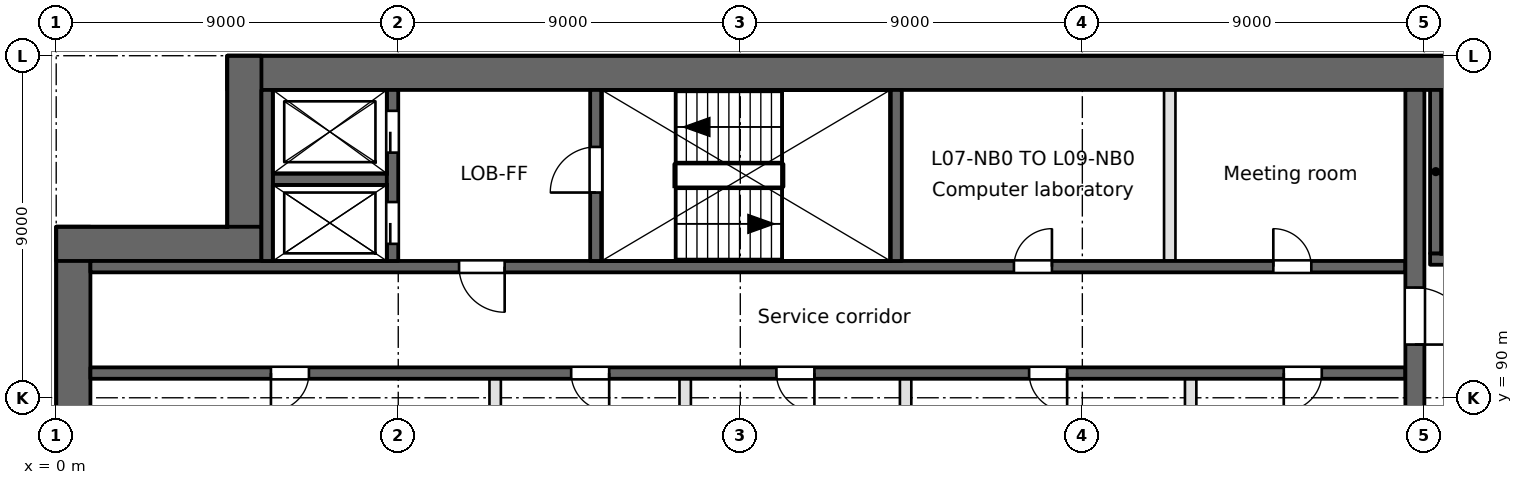
"""IFC4 building model, lengths in metres.
Left out: names, types, materials, properties, quantities, classifications, styles, units other than length and angle.
Written with IfcOpenShell. Run it as: python <this file> out.ifc"""

import sys

from ifc_helpers import new_model, si_unit, direction, frame, frame_2d, origin, place, context, subcontext, project, spatial, rectangle, extrude, element, fill, save


model = new_model("IFC4")
c1 = context("Model", 3, precision=1e-05, world=origin(), true_north=direction((0.0, 1.0)))
c2 = subcontext(c1, "Body", "Model", "MODEL_VIEW")
j1 = project(units=[si_unit("LENGTHUNIT", "METRE"), si_unit("PLANEANGLEUNIT", "RADIAN")], contexts=[c1])
p1 = place(None, origin())
s1 = spatial("IfcSite", under=j1, at=p1, CompositionType="ELEMENT")
p2 = place(p1, origin())
s2 = spatial("IfcBuilding", under=s1, at=p2, CompositionType="ELEMENT")
p3 = place(p2, frame((0.0, 0.0, 35.8)))
s3 = spatial("IfcBuildingStorey", under=s2, at=p3, CompositionType="ELEMENT", Elevation=35.8)
p4 = place(p3, frame((0.45, 94.5, 0.0), z_axis=(0.0, 0.0, 1.0), x_axis=(0.0, -1.0, 0.0)))
e1 = element("IfcWall", 1, at=p4, inside=s3, PredefinedType="SHEAR", context=c2, shape_type="SweptSolid", body=[
    extrude(rectangle(XDim=66.187, YDim=0.9, at=frame_2d((33.094, 0.0))), origin(), (0.0, 0.0, 1.0), 3.7),
])
p5 = place(p3, frame((94.5, 98.55, 0.0), z_axis=(0.0, 0.0, 1.0), x_axis=(-1.0, 0.0, 0.0)))
e2 = element("IfcWall", 2, at=p5, inside=s3, PredefinedType="SHEAR", context=c2, shape_type="SweptSolid", body=[
    extrude(rectangle(XDim=90.0, YDim=0.9, at=frame_2d((45.0, 0.0))), origin(), (0.0, 0.0, 1.0), 3.7),
])
for number, where, z_axis, x_axis in (
    (3, (4.95, 99.0, 0.0), (0.0, 0.0, 1.0), (0.0, -1.0, 0.0)),
    (4, (5.4, 94.05, 0.0), (0.0, 0.0, 1.0), (-1.0, 0.0, 0.0)),
):
    element("IfcWall", number, at=place(p3, frame(where, z_axis=z_axis, x_axis=x_axis)), inside=s3, PredefinedType="SHEAR", context=c2, shape_type="SweptSolid", body=[
        extrude(rectangle(XDim=5.4, YDim=0.9, at=frame_2d((2.7, 0.0))), origin(), (0.0, 0.0, 1.0), 3.7),
    ])
p6 = place(p3, frame((0.9, 90.65, -0.4), z_axis=(0.0, 0.0, 1.0), x_axis=(1.0, 0.0, 0.0)))
e5 = element("IfcWall", 5, at=p6, inside=s3, PredefinedType="SOLIDWALL", context=c2, shape_type="SweptSolid", body=[
    extrude(rectangle(XDim=34.6, YDim=0.3, at=frame_2d((17.3, 0.0))), origin(), (0.0, 0.0, 1.0), 3.7),
])
p7 = place(p6, frame((4.75, 0.0, 0.4)))
e6 = element("IfcOpeningElement", 6, at=p7, cuts=e5, PredefinedType="OPENING", context=c2, shape_type="SweptSolid", body=[
    extrude(rectangle(XDim=1.0, YDim=2.1, at=frame_2d((0.5, 1.05))), frame((0.0, 0.15, 0.0), z_axis=(0.0, -1.0, 0.0), x_axis=(1.0, 0.0, 0.0)), (0.0, 0.0, 1.0), 0.3),
])
p8 = place(p6, frame((24.7, 0.0, 0.4)))
e7 = element("IfcOpeningElement", 7, at=p8, cuts=e5, PredefinedType="OPENING", context=c2, shape_type="SweptSolid", body=[
    extrude(rectangle(XDim=1.0, YDim=2.1, at=frame_2d((0.5, 1.05))), frame((0.0, 0.15, 0.0), z_axis=(0.0, -1.0, 0.0), x_axis=(1.0, 0.0, 0.0)), (0.0, 0.0, 1.0), 0.3),
])
p9 = place(p6, frame((12.65, 0.0, 0.4)))
e8 = element("IfcOpeningElement", 8, at=p9, cuts=e5, PredefinedType="OPENING", context=c2, shape_type="SweptSolid", body=[
    extrude(rectangle(XDim=1.0, YDim=2.1, at=frame_2d((0.5, 1.05))), frame((0.0, 0.15, 0.0), z_axis=(0.0, -1.0, 0.0), x_axis=(1.0, 0.0, 0.0)), (0.0, 0.0, 1.0), 0.3),
])
p10 = place(p6, frame((18.05, 0.0, 0.4)))
e9 = element("IfcOpeningElement", 9, at=p10, cuts=e5, PredefinedType="OPENING", context=c2, shape_type="SweptSolid", body=[
    extrude(rectangle(XDim=1.0, YDim=2.1, at=frame_2d((0.5, 1.05))), frame((0.0, 0.15, 0.0), z_axis=(0.0, -1.0, 0.0), x_axis=(1.0, 0.0, 0.0)), (0.0, 0.0, 1.0), 0.3),
])
p11 = place(p6, frame((31.4, 0.0, 0.4)))
e10 = element("IfcOpeningElement", 10, at=p11, cuts=e5, PredefinedType="OPENING", context=c2, shape_type="SweptSolid", body=[
    extrude(rectangle(XDim=1.0, YDim=2.1, at=frame_2d((0.5, 1.05))), frame((0.0, 0.15, 0.0), z_axis=(0.0, -1.0, 0.0), x_axis=(1.0, 0.0, 0.0)), (0.0, 0.0, 1.0), 0.3),
])
p12 = place(p3, frame((0.9, 93.45, -0.4), z_axis=(0.0, 0.0, 1.0), x_axis=(1.0, 0.0, 0.0)))
e11 = element("IfcWall", 11, at=p12, inside=s3, PredefinedType="SOLIDWALL", context=c2, shape_type="SweptSolid", body=[
    extrude(rectangle(XDim=34.6, YDim=0.3, at=frame_2d((17.3, 0.0))), origin(), (0.0, 0.0, 1.0), 3.7),
])
p13 = place(p12, frame((9.7, 0.0, 0.4)))
e12 = element("IfcOpeningElement", 12, at=p13, cuts=e11, PredefinedType="OPENING", context=c2, shape_type="SweptSolid", body=[
    extrude(rectangle(XDim=1.2, YDim=2.1, at=frame_2d((0.6, 1.05))), frame((0.0, 0.15, 0.0), z_axis=(0.0, -1.0, 0.0), x_axis=(1.0, 0.0, 0.0)), (0.0, 0.0, 1.0), 0.3),
])
p14 = place(p12, frame((24.3, 0.0, 0.4)))
e13 = element("IfcOpeningElement", 13, at=p14, cuts=e11, PredefinedType="OPENING", context=c2, shape_type="SweptSolid", body=[
    extrude(rectangle(XDim=1.0, YDim=2.1, at=frame_2d((0.5, 1.05))), frame((0.0, 0.15, 0.0), z_axis=(0.0, -1.0, 0.0), x_axis=(1.0, 0.0, 0.0)), (0.0, 0.0, 1.0), 0.3),
])
p15 = place(p12, frame((31.125, 0.0, 0.4)))
e14 = element("IfcOpeningElement", 14, at=p15, cuts=e11, PredefinedType="OPENING", context=c2, shape_type="SweptSolid", body=[
    extrude(rectangle(XDim=1.0, YDim=2.1, at=frame_2d((0.5, 1.05))), frame((0.0, 0.15, 0.0), z_axis=(0.0, -1.0, 0.0), x_axis=(1.0, 0.0, 0.0)), (0.0, 0.0, 1.0), 0.3),
])
p16 = place(p3, frame((36.15, 93.65, -0.4), z_axis=(0.0, 0.0, 1.0), x_axis=(1.0, 0.0, 0.0)))
e15 = element("IfcWall", 15, at=p16, inside=s3, PredefinedType="SOLIDWALL", context=c2, shape_type="SweptSolid", body=[
    extrude(rectangle(XDim=8.2, YDim=0.3, at=frame_2d((4.1, 0.0))), origin(), (0.0, 0.0, 1.0), 3.7),
])
p17 = place(p16, frame((0.7, 0.0, 0.4)))
e16 = element("IfcOpeningElement", 16, at=p17, cuts=e15, PredefinedType="OPENING", context=c2, shape_type="SweptSolid", body=[
    extrude(rectangle(XDim=1.2, YDim=2.1, at=frame_2d((0.6, 1.05))), frame((0.0, 0.15, 0.0), z_axis=(0.0, -1.0, 0.0), x_axis=(1.0, 0.0, 0.0)), (0.0, 0.0, 1.0), 0.3),
])
p18 = place(p3, frame((5.7, 95.75, -0.4), z_axis=(0.0, 0.0, 1.0), x_axis=(1.0, 0.0, 0.0)))
e17 = element("IfcWall", 17, at=p18, inside=s3, PredefinedType="SOLIDWALL", context=c2, shape_type="SweptSolid", body=[
    extrude(rectangle(XDim=3.0, YDim=0.3, at=frame_2d((1.5, 0.0))), origin(), (0.0, 0.0, 1.0), 3.7),
])
p19 = place(p3, frame((5.55, 93.6, -0.4), z_axis=(0.0, 0.0, 1.0), x_axis=(0.0, 1.0, 0.0)))
e18 = element("IfcWall", 18, at=p19, inside=s3, PredefinedType="SOLIDWALL", context=c2, shape_type="SweptSolid", body=[
    extrude(rectangle(XDim=4.5, YDim=0.3, at=frame_2d((2.25, 0.0))), origin(), (0.0, 0.0, 1.0), 3.7),
])
p20 = place(p3, frame((8.85, 93.6, -0.4), z_axis=(0.0, 0.0, 1.0), x_axis=(0.0, 1.0, 0.0)))
e19 = element("IfcWall", 19, at=p20, inside=s3, PredefinedType="SOLIDWALL", context=c2, shape_type="SweptSolid", body=[
    extrude(rectangle(XDim=4.5, YDim=0.3, at=frame_2d((2.25, 0.0))), origin(), (0.0, 0.0, 1.0), 3.7),
])
p21 = place(p20, frame((0.45, 0.0, 0.4)))
e20 = element("IfcOpeningElement", 20, at=p21, cuts=e19, PredefinedType="OPENING", context=c2, shape_type="SweptSolid", body=[
    extrude(rectangle(XDim=1.1, YDim=2.1, at=frame_2d((0.55, 1.05))), frame((0.0, 0.15, 0.0), z_axis=(0.0, -1.0, 0.0), x_axis=(1.0, 0.0, 0.0)), (0.0, 0.0, 1.0), 0.3),
])
p22 = place(p20, frame((2.85, 0.0, 0.4)))
e21 = element("IfcOpeningElement", 21, at=p22, cuts=e19, PredefinedType="OPENING", context=c2, shape_type="SweptSolid", body=[
    extrude(rectangle(XDim=1.1, YDim=2.1, at=frame_2d((0.55, 1.05))), frame((0.0, 0.15, 0.0), z_axis=(0.0, -1.0, 0.0), x_axis=(1.0, 0.0, 0.0)), (0.0, 0.0, 1.0), 0.3),
])
p23 = place(p3, frame((11.55, 87.95, 0.0), z_axis=(0.0, 0.0, 1.0), x_axis=(0.0, 1.0, 0.0)))
e22 = element("IfcWall", 22, at=p23, inside=s3, PredefinedType="PARTITIONING", context=c2, shape_type="SweptSolid", body=[
    extrude(rectangle(XDim=2.55, YDim=0.3, at=frame_2d((1.275, 0.0))), origin(), (0.0, 0.0, 1.0), 3.3),
])
p24 = place(p3, frame((14.2, 93.6, -0.4), z_axis=(0.0, 0.0, 1.0), x_axis=(0.0, 1.0, 0.0)))
e23 = element("IfcWall", 23, at=p24, inside=s3, PredefinedType="SOLIDWALL", context=c2, shape_type="SweptSolid", body=[
    extrude(rectangle(XDim=4.5, YDim=0.3, at=frame_2d((2.25, 0.0))), origin(), (0.0, 0.0, 1.0), 3.7),
])
p25 = place(p24, frame((1.8, 0.0, 0.4)))
e24 = element("IfcOpeningElement", 24, at=p25, cuts=e23, PredefinedType="OPENING", context=c2, shape_type="SweptSolid", body=[
    extrude(rectangle(XDim=1.2, YDim=2.1, at=frame_2d((0.6, 1.05))), frame((0.0, 0.15, 0.0), z_axis=(0.0, -1.0, 0.0), x_axis=(1.0, 0.0, 0.0)), (0.0, 0.0, 1.0), 0.3),
])
p26 = place(p3, frame((16.55, 77.55, 0.0), z_axis=(0.0, 0.0, 1.0), x_axis=(0.0, 1.0, 0.0)))
e25 = element("IfcWall", 25, at=p26, inside=s3, PredefinedType="PARTITIONING", context=c2, shape_type="SweptSolid", body=[
    extrude(rectangle(XDim=12.95, YDim=0.3, at=frame_2d((6.475, 0.0))), origin(), (0.0, 0.0, 1.0), 3.3),
])
p27 = place(p3, frame((22.1, 93.6, -0.4), z_axis=(0.0, 0.0, 1.0), x_axis=(0.0, 1.0, 0.0)))
e26 = element("IfcWall", 26, at=p27, inside=s3, PredefinedType="SOLIDWALL", context=c2, shape_type="SweptSolid", body=[
    extrude(rectangle(XDim=4.5, YDim=0.3, at=frame_2d((2.25, 0.0))), origin(), (0.0, 0.0, 1.0), 3.7),
])
p28 = place(p3, frame((22.35, 87.95, 0.0), z_axis=(0.0, 0.0, 1.0), x_axis=(0.0, 1.0, 0.0)))
e27 = element("IfcWall", 27, at=p28, inside=s3, PredefinedType="PARTITIONING", context=c2, shape_type="SweptSolid", body=[
    extrude(rectangle(XDim=2.55, YDim=0.3, at=frame_2d((1.275, 0.0))), origin(), (0.0, 0.0, 1.0), 3.3),
])
p29 = place(p3, frame((29.3, 93.6, 0.0), z_axis=(0.0, 0.0, 1.0), x_axis=(0.0, 1.0, 0.0)))
e28 = element("IfcWall", 28, at=p29, inside=s3, PredefinedType="PARTITIONING", context=c2, shape_type="SweptSolid", body=[
    extrude(rectangle(XDim=4.5, YDim=0.3, at=frame_2d((2.25, 0.0))), origin(), (0.0, 0.0, 1.0), 3.3),
])
p30 = place(p3, frame((29.85, 87.95, 0.0), z_axis=(0.0, 0.0, 1.0), x_axis=(0.0, 1.0, 0.0)))
e29 = element("IfcWall", 29, at=p30, inside=s3, PredefinedType="PARTITIONING", context=c2, shape_type="SweptSolid", body=[
    extrude(rectangle(XDim=2.55, YDim=0.3, at=frame_2d((1.275, 0.0))), origin(), (0.0, 0.0, 1.0), 3.3),
])
p31 = place(p3, frame((35.75, 63.5, -0.4), z_axis=(0.0, 0.0, 1.0), x_axis=(0.0, 1.0, 0.0)))
e30 = element("IfcWall", 30, at=p31, inside=s3, PredefinedType="SOLIDWALL", context=c2, shape_type="SweptSolid", body=[
    extrude(rectangle(XDim=34.6, YDim=0.5, at=frame_2d((17.3, 0.0))), origin(), (0.0, 0.0, 1.0), 3.7),
])
p32 = place(p31, frame((9.7, 0.0, 0.4)))
e31 = element("IfcOpeningElement", 31, at=p32, cuts=e30, PredefinedType="OPENING", context=c2, shape_type="SweptSolid", body=[
    extrude(rectangle(XDim=2.4, YDim=2.1, at=frame_2d((1.2, 1.05))), frame((0.0, 0.25, 0.0), z_axis=(0.0, -1.0, 0.0), x_axis=(1.0, 0.0, 0.0)), (0.0, 0.0, 1.0), 0.5),
])
p33 = place(p31, frame((27.9, 0.0, 0.4)))
e32 = element("IfcOpeningElement", 32, at=p33, cuts=e30, PredefinedType="OPENING", context=c2, shape_type="SweptSolid", body=[
    extrude(rectangle(XDim=1.5, YDim=2.1, at=frame_2d((0.75, 1.05))), frame((0.0, 0.25, 0.0), z_axis=(0.0, -1.0, 0.0), x_axis=(1.0, 0.0, 0.0)), (0.0, 0.0, 1.0), 0.5),
])
p34 = place(p31, frame((1.5, 0.0, 0.4)))
e33 = element("IfcOpeningElement", 33, at=p34, cuts=e30, PredefinedType="OPENING", context=c2, shape_type="SweptSolid", body=[
    extrude(rectangle(XDim=1.2, YDim=2.1, at=frame_2d((0.6, 1.05))), frame((0.0, 0.25, 0.0), z_axis=(0.0, -1.0, 0.0), x_axis=(1.0, 0.0, 0.0)), (0.0, 0.0, 1.0), 0.5),
])
p35 = place(p3, frame((36.3, 93.8, -0.4), z_axis=(0.0, 0.0, 1.0), x_axis=(0.0, 1.0, 0.0)))
e34 = element("IfcWall", 34, at=p35, inside=s3, PredefinedType="SOLIDWALL", context=c2, shape_type="SweptSolid", body=[
    extrude(rectangle(XDim=4.3, YDim=0.3, at=frame_2d((2.15, 0.0))), origin(), (0.0, 0.0, 1.0), 3.7),
])
p36 = place(p21, origin())
e35 = element("IfcDoor", 35, at=p36, inside=s3, OperationType="SLIDING_TO_RIGHT", PredefinedType="DOOR", context=c2, shape_type="SweptSolid", body=[
    extrude(rectangle(XDim=1.1, YDim=2.1, at=frame_2d((0.55, 1.05))), frame((0.0, 0.025, 0.0), z_axis=(0.0, -1.0, 0.0), x_axis=(1.0, 0.0, 0.0)), (0.0, 0.0, 1.0), 0.05),
])
fill(e20, e35)
p37 = place(p22, origin())
e36 = element("IfcDoor", 36, at=p37, inside=s3, OperationType="SLIDING_TO_LEFT", PredefinedType="DOOR", context=c2, shape_type="SweptSolid", body=[
    extrude(rectangle(XDim=1.1, YDim=2.1, at=frame_2d((0.55, 1.05))), frame((0.0, 0.025, 0.0), z_axis=(0.0, -1.0, 0.0), x_axis=(1.0, 0.0, 0.0)), (0.0, 0.0, 1.0), 0.05),
])
fill(e21, e36)
p38 = place(p13, frame((1.2, 0.0, 0.0), z_axis=(0.0, 0.0, 1.0), x_axis=(-1.0, 0.0, 0.0)))
e37 = element("IfcDoor", 37, at=p38, inside=s3, OperationType="SINGLE_SWING_LEFT", PredefinedType="DOOR", context=c2, shape_type="SweptSolid", body=[
    extrude(rectangle(XDim=1.2, YDim=2.1, at=frame_2d((0.6, 1.05))), frame((0.0, 0.025, 0.0), z_axis=(0.0, -1.0, 0.0), x_axis=(1.0, 0.0, 0.0)), (0.0, 0.0, 1.0), 0.05),
])
fill(e12, e37)
p39 = place(p33, frame((1.5, 0.0, 0.0), z_axis=(0.0, 0.0, 1.0), x_axis=(-1.0, 0.0, 0.0)))
e38 = element("IfcDoor", 38, at=p39, inside=s3, OperationType="SINGLE_SWING_RIGHT", PredefinedType="DOOR", context=c2, shape_type="SweptSolid", body=[
    extrude(rectangle(XDim=1.5, YDim=2.1, at=frame_2d((0.75, 1.05))), frame((0.0, 0.025, 0.0), z_axis=(0.0, -1.0, 0.0), x_axis=(1.0, 0.0, 0.0)), (0.0, 0.0, 1.0), 0.05),
])
fill(e32, e38)
p40 = place(p25, origin())
e39 = element("IfcDoor", 39, at=p40, inside=s3, OperationType="SINGLE_SWING_LEFT", PredefinedType="DOOR", context=c2, shape_type="SweptSolid", body=[
    extrude(rectangle(XDim=1.2, YDim=2.1, at=frame_2d((0.6, 1.05))), frame((0.0, 0.025, 0.0), z_axis=(0.0, -1.0, 0.0), x_axis=(1.0, 0.0, 0.0)), (0.0, 0.0, 1.0), 0.05),
])
fill(e24, e39)
p41 = place(p7, frame((1.0, 0.0, 0.0), z_axis=(0.0, 0.0, 1.0), x_axis=(-1.0, 0.0, 0.0)))
e40 = element("IfcDoor", 40, at=p41, inside=s3, OperationType="SINGLE_SWING_RIGHT", PredefinedType="DOOR", context=c2, shape_type="SweptSolid", body=[
    extrude(rectangle(XDim=1.0, YDim=2.1, at=frame_2d((0.5, 1.05))), frame((0.0, 0.025, 0.0), z_axis=(0.0, -1.0, 0.0), x_axis=(1.0, 0.0, 0.0)), (0.0, 0.0, 1.0), 0.05),
])
fill(e6, e40)
p42 = place(p8, frame((1.0, 0.0, 0.0), z_axis=(0.0, 0.0, 1.0), x_axis=(-1.0, 0.0, 0.0)))
e41 = element("IfcDoor", 41, at=p42, inside=s3, OperationType="SINGLE_SWING_LEFT", PredefinedType="DOOR", context=c2, shape_type="SweptSolid", body=[
    extrude(rectangle(XDim=1.0, YDim=2.1, at=frame_2d((0.5, 1.05))), frame((0.0, 0.025, 0.0), z_axis=(0.0, -1.0, 0.0), x_axis=(1.0, 0.0, 0.0)), (0.0, 0.0, 1.0), 0.05),
])
fill(e7, e41)
p43 = place(p9, frame((1.0, 0.0, 0.0), z_axis=(0.0, 0.0, 1.0), x_axis=(-1.0, 0.0, 0.0)))
e42 = element("IfcDoor", 42, at=p43, inside=s3, OperationType="SINGLE_SWING_LEFT", PredefinedType="DOOR", context=c2, shape_type="SweptSolid", body=[
    extrude(rectangle(XDim=1.0, YDim=2.1, at=frame_2d((0.5, 1.05))), frame((0.0, 0.025, 0.0), z_axis=(0.0, -1.0, 0.0), x_axis=(1.0, 0.0, 0.0)), (0.0, 0.0, 1.0), 0.05),
])
fill(e8, e42)
p44 = place(p10, frame((1.0, 0.0, 0.0), z_axis=(0.0, 0.0, 1.0), x_axis=(-1.0, 0.0, 0.0)))
e43 = element("IfcDoor", 43, at=p44, inside=s3, OperationType="SINGLE_SWING_LEFT", PredefinedType="DOOR", context=c2, shape_type="SweptSolid", body=[
    extrude(rectangle(XDim=1.0, YDim=2.1, at=frame_2d((0.5, 1.05))), frame((0.0, 0.025, 0.0), z_axis=(0.0, -1.0, 0.0), x_axis=(1.0, 0.0, 0.0)), (0.0, 0.0, 1.0), 0.05),
])
fill(e9, e43)
p45 = place(p11, frame((1.0, 0.0, 0.0), z_axis=(0.0, 0.0, 1.0), x_axis=(-1.0, 0.0, 0.0)))
e44 = element("IfcDoor", 44, at=p45, inside=s3, OperationType="SINGLE_SWING_RIGHT", PredefinedType="DOOR", context=c2, shape_type="SweptSolid", body=[
    extrude(rectangle(XDim=1.0, YDim=2.1, at=frame_2d((0.5, 1.05))), frame((0.0, 0.025, 0.0), z_axis=(0.0, -1.0, 0.0), x_axis=(1.0, 0.0, 0.0)), (0.0, 0.0, 1.0), 0.05),
])
fill(e10, e44)
p46 = place(p14, origin())
e45 = element("IfcDoor", 45, at=p46, inside=s3, OperationType="SINGLE_SWING_RIGHT", PredefinedType="DOOR", context=c2, shape_type="SweptSolid", body=[
    extrude(rectangle(XDim=1.0, YDim=2.1, at=frame_2d((0.5, 1.05))), frame((0.0, 0.025, 0.0), z_axis=(0.0, -1.0, 0.0), x_axis=(1.0, 0.0, 0.0)), (0.0, 0.0, 1.0), 0.05),
])
fill(e13, e45)
p47 = place(p15, origin())
e46 = element("IfcDoor", 46, at=p47, inside=s3, OperationType="SINGLE_SWING_LEFT", PredefinedType="DOOR", context=c2, shape_type="SweptSolid", body=[
    extrude(rectangle(XDim=1.0, YDim=2.1, at=frame_2d((0.5, 1.05))), frame((0.0, 0.025, 0.0), z_axis=(0.0, -1.0, 0.0), x_axis=(1.0, 0.0, 0.0)), (0.0, 0.0, 1.0), 0.05),
])
fill(e14, e46)
save(model, sys.argv[1])
